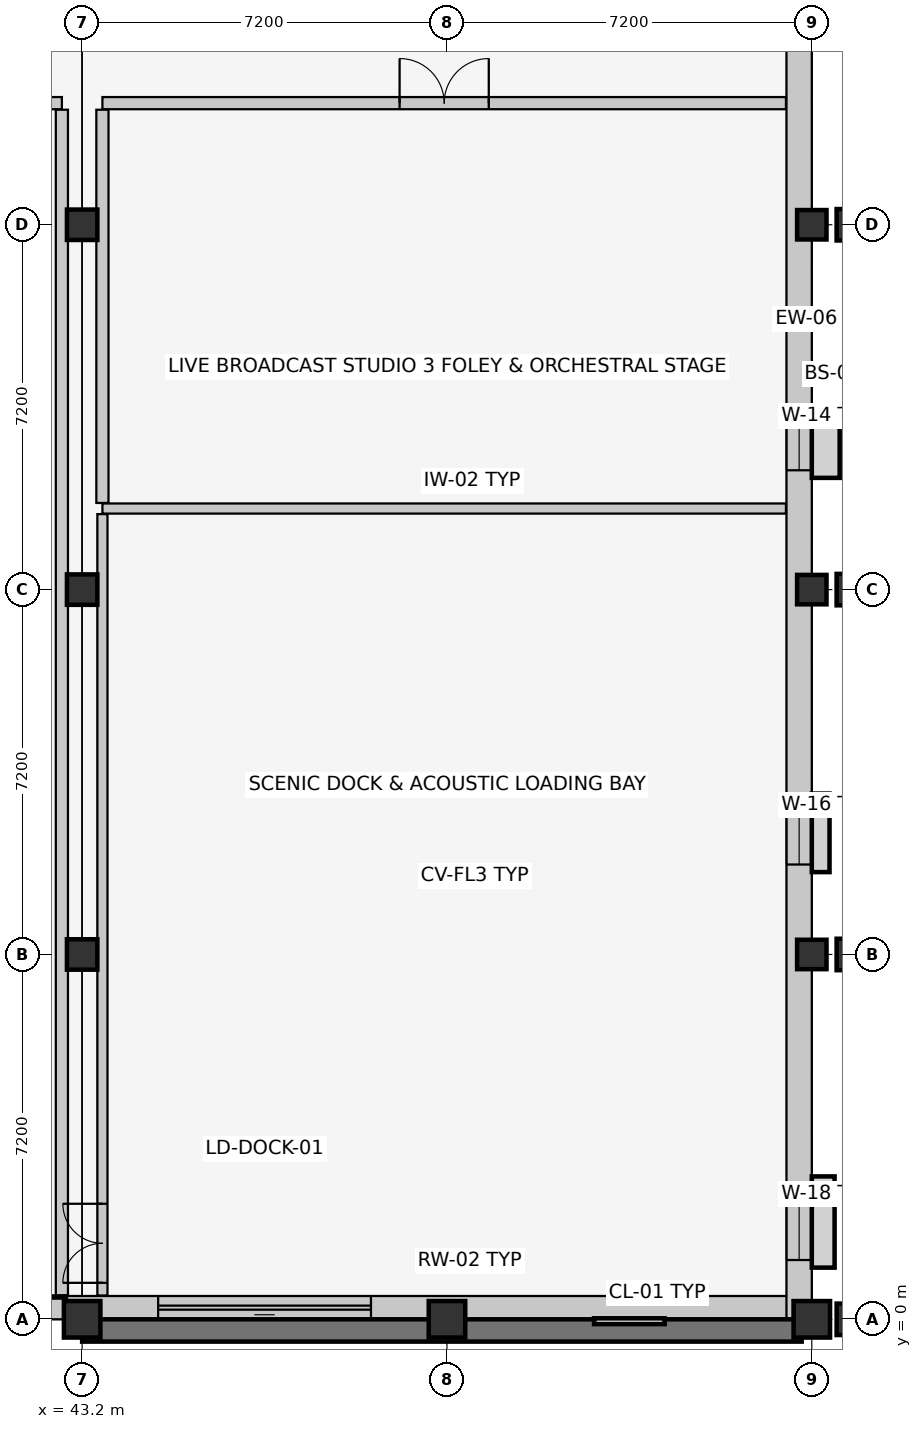
"""IFC4 building model, lengths in metres.
Left out: names, types, materials, properties, quantities, classifications, styles, units other than length and angle.
Written with IfcOpenShell. Run it as: python <this file> out.ifc"""

import sys

from ifc_helpers import new_model, si_unit, direction, frame, frame_2d, origin, origin_2d, place, context, subcontext, project, spatial, rectangle, extrude, element, fill, save


model = new_model("IFC4")
c1 = context("Model", 3, precision=1e-05, world=origin(), true_north=direction((0.0, 1.0)))
c2 = subcontext(c1, "Body", "Model", "MODEL_VIEW")
j1 = project(units=[si_unit("LENGTHUNIT", "METRE"), si_unit("PLANEANGLEUNIT", "RADIAN")], contexts=[c1])
p1 = place(None, origin())
s1 = spatial("IfcSite", under=j1, at=p1, CompositionType="ELEMENT")
p2 = place(p1, origin())
s2 = spatial("IfcBuilding", under=s1, at=p2, CompositionType="ELEMENT")
p3 = place(p2, origin())
s3 = spatial("IfcBuildingStorey", under=s2, at=p3, CompositionType="ELEMENT", Elevation=0.0)
p4 = place(p3, frame((43.2, 0.0, 0.0), z_axis=(0.0, 0.0, 1.0), x_axis=(1.0, 0.0, 0.0)))
e1 = element("IfcColumn", 1, at=p4, inside=s3, PredefinedType="COLUMN", context=c2, shape_type="SweptSolid", body=[
    extrude(rectangle(XDim=0.72, YDim=0.72, at=origin_2d()), origin(), (0.0, 0.0, 1.0), 5.4),
])
for number, where, z_axis, x_axis in (
    (2, (43.2, 7.2, 0.0), (0.0, 0.0, 1.0), (1.0, 0.0, 0.0)),
    (3, (43.2, 14.4, 0.0), (0.0, 0.0, 1.0), (1.0, 0.0, 0.0)),
    (4, (43.2, 21.6, 0.0), (0.0, 0.0, 1.0), (1.0, 0.0, 0.0)),
):
    element("IfcColumn", number, at=place(p3, frame(where, z_axis=z_axis, x_axis=x_axis)), inside=s3, PredefinedType="COLUMN", context=c2, shape_type="SweptSolid", body=[
        extrude(rectangle(XDim=0.6, YDim=0.6, at=origin_2d()), origin(), (0.0, 0.0, 1.0), 5.4),
    ])
for number, where, z_axis, x_axis in (
    (5, (50.4, 0.0, 0.0), (0.0, 0.0, 1.0), (1.0, 0.0, 0.0)),
    (6, (57.6, 0.0, 0.0), (0.0, 0.0, 1.0), (1.0, 0.0, 0.0)),
):
    element("IfcColumn", number, at=place(p3, frame(where, z_axis=z_axis, x_axis=x_axis)), inside=s3, PredefinedType="COLUMN", context=c2, shape_type="SweptSolid", body=[
        extrude(rectangle(XDim=0.72, YDim=0.72, at=origin_2d()), origin(), (0.0, 0.0, 1.0), 5.4),
    ])
for number, where, z_axis, x_axis in (
    (7, (57.6, 7.2, 0.0), (0.0, 0.0, 1.0), (1.0, 0.0, 0.0)),
    (8, (57.6, 14.4, 0.0), (0.0, 0.0, 1.0), (1.0, 0.0, 0.0)),
    (9, (57.6, 21.6, 0.0), (0.0, 0.0, 1.0), (1.0, 0.0, 0.0)),
):
    element("IfcColumn", number, at=place(p3, frame(where, z_axis=z_axis, x_axis=x_axis)), inside=s3, PredefinedType="COLUMN", context=c2, shape_type="SweptSolid", body=[
        extrude(rectangle(XDim=0.58, YDim=0.58, at=origin_2d()), origin(), (0.0, 0.0, 1.0), 5.4),
    ])
for number, where, z_axis, x_axis in (
    (10, (58.4, 0.0, 0.0), (0.0, 0.0, 1.0), (1.0, 0.0, 0.0)),
    (11, (58.4, 7.2, 0.0), (0.0, 0.0, 1.0), (1.0, 0.0, 0.0)),
    (12, (58.4, 14.4, 0.0), (0.0, 0.0, 1.0), (1.0, 0.0, 0.0)),
    (13, (58.4, 21.6, 0.0), (0.0, 0.0, 1.0), (1.0, 0.0, 0.0)),
):
    element("IfcColumn", number, at=place(p3, frame(where, z_axis=z_axis, x_axis=x_axis)), inside=s3, PredefinedType="COLUMN", context=c2, shape_type="SweptSolid", body=[
        extrude(rectangle(XDim=0.62, YDim=0.62, at=origin_2d()), origin(), (0.0, 0.0, 1.0), 5.4),
    ])
p5 = place(p3, frame((57.6, 0.23, 0.0), z_axis=(0.0, 0.0, 1.0), x_axis=(-1.0, 0.0, 0.0)))
e14 = element("IfcWall", 14, at=p5, inside=s3, PredefinedType="SOLIDWALL", context=c2, shape_type="SweptSolid", body=[
    extrude(rectangle(XDim=57.6, YDim=0.46, at=frame_2d((28.8, 0.0))), origin(), (0.0, 0.0, 1.0), 5.4),
])
p6 = place(p5, frame((8.7, 0.0, 0.0)))
e15 = element("IfcOpeningElement", 15, at=p6, cuts=e14, PredefinedType="OPENING", context=c2, shape_type="SweptSolid", body=[
    extrude(rectangle(XDim=4.2, YDim=4.8, at=frame_2d((2.1, 2.4))), frame((0.0, 0.242, 0.0), z_axis=(0.0, -1.0, 0.0), x_axis=(1.0, 0.0, 0.0)), (0.0, 0.0, 1.0), 0.484),
])
p7 = place(p3, frame((57.35, 38.4, 0.0), z_axis=(0.0, 0.0, 1.0), x_axis=(0.0, -1.0, 0.0)))
e16 = element("IfcWall", 16, at=p7, inside=s3, PredefinedType="SOLIDWALL", context=c2, shape_type="SweptSolid", body=[
    extrude(rectangle(XDim=38.4, YDim=0.5, at=frame_2d((19.2, 0.0))), origin(), (0.0, 0.0, 1.0), 4.255),
])
p8 = place(p7, frame((10.9, 0.0, 0.0)))
e17 = element("IfcOpeningElement", 17, at=p8, cuts=e16, PredefinedType="OPENING", context=c2, shape_type="SweptSolid", body=[
    extrude(rectangle(XDim=2.2, YDim=2.4, at=frame_2d((1.1, 1.2))), frame((0.0, 0.262, 0.0), z_axis=(0.0, -1.0, 0.0), x_axis=(1.0, 0.0, 0.0)), (0.0, 0.0, 1.0), 0.524),
])
p9 = place(p7, frame((1.345, 0.0, 0.9)))
e18 = element("IfcOpeningElement", 18, at=p9, cuts=e16, PredefinedType="OPENING", context=c2, shape_type="SweptSolid", body=[
    extrude(rectangle(XDim=1.15, YDim=1.45, at=frame_2d((0.575, 0.725))), frame((0.0, 0.262, 0.0), z_axis=(0.0, -1.0, 0.0), x_axis=(1.0, 0.0, 0.0)), (0.0, 0.0, 1.0), 0.524),
])
p10 = place(p7, frame((5.135, 0.0, 0.9)))
e19 = element("IfcOpeningElement", 19, at=p10, cuts=e16, PredefinedType="OPENING", context=c2, shape_type="SweptSolid", body=[
    extrude(rectangle(XDim=1.25, YDim=1.45, at=frame_2d((0.625, 0.725))), frame((0.0, 0.262, 0.0), z_axis=(0.0, -1.0, 0.0), x_axis=(1.0, 0.0, 0.0)), (0.0, 0.0, 1.0), 0.524),
])
p11 = place(p7, frame((20.595, 0.0, 0.9)))
e20 = element("IfcOpeningElement", 20, at=p11, cuts=e16, PredefinedType="OPENING", context=c2, shape_type="SweptSolid", body=[
    extrude(rectangle(XDim=1.05, YDim=1.6, at=frame_2d((0.525, 0.8))), frame((0.0, 0.262, 0.0), z_axis=(0.0, -1.0, 0.0), x_axis=(1.0, 0.0, 0.0)), (0.0, 0.0, 1.0), 0.524),
])
p12 = place(p7, frame((28.175, 0.0, 0.9)))
e21 = element("IfcOpeningElement", 21, at=p12, cuts=e16, PredefinedType="OPENING", context=c2, shape_type="SweptSolid", body=[
    extrude(rectangle(XDim=1.25, YDim=1.6, at=frame_2d((0.625, 0.8))), frame((0.0, 0.262, 0.0), z_axis=(0.0, -1.0, 0.0), x_axis=(1.0, 0.0, 0.0)), (0.0, 0.0, 1.0), 0.524),
])
p13 = place(p7, frame((35.73, 0.0, 0.9)))
e22 = element("IfcOpeningElement", 22, at=p13, cuts=e16, PredefinedType="OPENING", context=c2, shape_type="SweptSolid", body=[
    extrude(rectangle(XDim=1.5, YDim=1.6, at=frame_2d((0.75, 0.8))), frame((0.0, 0.262, 0.0), z_axis=(0.0, -1.0, 0.0), x_axis=(1.0, 0.0, 0.0)), (0.0, 0.0, 1.0), 0.524),
])
p14 = place(p3, frame((43.2, -0.22, -0.8), z_axis=(0.0, 0.0, 1.0), x_axis=(1.0, 0.0, 0.0)))
e23 = element("IfcWall", 23, at=p14, inside=s3, PredefinedType="USERDEFINED", context=c2, shape_type="SweptSolid", body=[
    extrude(rectangle(XDim=14.2, YDim=0.44, at=frame_2d((7.1, 0.0))), origin(), (0.0, 0.0, 1.0), 1.3),
])
p15 = place(p3, frame((29.2, 24.0, 0.0), z_axis=(0.0, 0.0, 1.0), x_axis=(1.0, 0.0, 0.0)))
e24 = element("IfcWall", 24, at=p15, inside=s3, PredefinedType="PARTITIONING", context=c2, shape_type="SweptSolid", body=[
    extrude(rectangle(XDim=13.6, YDim=0.24, at=frame_2d((6.8, 0.0))), origin(), (0.0, 0.0, 1.0), 5.15),
])
p16 = place(p15, frame((5.96, 0.0, 0.0)))
e25 = element("IfcOpeningElement", 25, at=p16, cuts=e24, PredefinedType="OPENING", context=c2, shape_type="SweptSolid", body=[
    extrude(rectangle(XDim=1.68, YDim=2.3, at=frame_2d((0.84, 1.15))), frame((0.0, 0.132, 0.0), z_axis=(0.0, -1.0, 0.0), x_axis=(1.0, 0.0, 0.0)), (0.0, 0.0, 1.0), 0.264),
])
p17 = place(p3, frame((42.8, 0.47, 0.0), z_axis=(0.0, 0.0, 1.0), x_axis=(0.0, 1.0, 0.0)))
e26 = element("IfcWall", 26, at=p17, inside=s3, PredefinedType="PARTITIONING", context=c2, shape_type="SweptSolid", body=[
    extrude(rectangle(XDim=23.4, YDim=0.24, at=frame_2d((11.7, 0.0))), origin(), (0.0, 0.0, 1.0), 5.15),
])
p18 = place(p3, frame((43.6, 16.0, 0.0), z_axis=(0.0, 0.0, 1.0), x_axis=(1.0, 0.0, 0.0)))
e27 = element("IfcWall", 27, at=p18, inside=s3, PredefinedType="PARTITIONING", context=c2, shape_type="SweptSolid", body=[
    extrude(rectangle(XDim=13.49, YDim=0.2, at=frame_2d((6.745, 0.0))), origin(), (0.0, 0.0, 1.0), 5.15),
])
p19 = place(p3, frame((43.6, 0.47, 0.0), z_axis=(0.0, 0.0, 1.0), x_axis=(0.0, 1.0, 0.0)))
e28 = element("IfcWall", 28, at=p19, inside=s3, PredefinedType="PARTITIONING", context=c2, shape_type="SweptSolid", body=[
    extrude(rectangle(XDim=15.42, YDim=0.2, at=frame_2d((7.71, 0.0))), origin(), (0.0, 0.0, 1.0), 5.15),
])
p20 = place(p19, frame((0.25, 0.0, 0.0)))
e29 = element("IfcOpeningElement", 29, at=p20, cuts=e28, PredefinedType="OPENING", context=c2, shape_type="SweptSolid", body=[
    extrude(rectangle(XDim=1.56, YDim=2.25, at=frame_2d((0.78, 1.125))), frame((0.0, 0.112, 0.0), z_axis=(0.0, -1.0, 0.0), x_axis=(1.0, 0.0, 0.0)), (0.0, 0.0, 1.0), 0.224),
])
p21 = place(p3, frame((43.6, 24.0, 0.0), z_axis=(0.0, 0.0, 1.0), x_axis=(1.0, 0.0, 0.0)))
e30 = element("IfcWall", 30, at=p21, inside=s3, PredefinedType="PARTITIONING", context=c2, shape_type="SweptSolid", body=[
    extrude(rectangle(XDim=13.49, YDim=0.24, at=frame_2d((6.745, 0.0))), origin(), (0.0, 0.0, 1.0), 5.15),
])
p22 = place(p21, frame((5.865, 0.0, 0.0)))
e31 = element("IfcOpeningElement", 31, at=p22, cuts=e30, PredefinedType="OPENING", context=c2, shape_type="SweptSolid", body=[
    extrude(rectangle(XDim=1.76, YDim=2.3, at=frame_2d((0.88, 1.15))), frame((0.0, 0.132, 0.0), z_axis=(0.0, -1.0, 0.0), x_axis=(1.0, 0.0, 0.0)), (0.0, 0.0, 1.0), 0.264),
])
p23 = place(p3, frame((43.6, 16.11, 0.0), z_axis=(0.0, 0.0, 1.0), x_axis=(0.0, 1.0, 0.0)))
e32 = element("IfcWall", 32, at=p23, inside=s3, PredefinedType="PARTITIONING", context=c2, shape_type="SweptSolid", body=[
    extrude(rectangle(XDim=7.76, YDim=0.24, at=frame_2d((3.88, 0.0))), origin(), (0.0, 0.0, 1.0), 5.15),
])
p24 = place(p6, origin())
e33 = element("IfcDoor", 33, at=p24, inside=s3, OperationType="ROLLINGUP", PredefinedType="GATE", context=c2, shape_type="SweptSolid", body=[
    extrude(rectangle(XDim=4.2, YDim=4.8, at=frame_2d((2.1, 2.4))), frame((0.0, 0.025, 0.0), z_axis=(0.0, -1.0, 0.0), x_axis=(1.0, 0.0, 0.0)), (0.0, 0.0, 1.0), 0.05),
])
fill(e15, e33)
p25 = place(p11, origin())
e34 = element("IfcWindow", 34, at=p25, inside=s3, PartitioningType="SINGLE_PANEL", PredefinedType="WINDOW", context=c2, shape_type="SweptSolid", body=[
    extrude(rectangle(XDim=1.05, YDim=1.6, at=frame_2d((0.525, 0.8))), frame((0.0, 0.03, 0.0), z_axis=(0.0, -1.0, 0.0), x_axis=(1.0, 0.0, 0.0)), (0.0, 0.0, 1.0), 0.06),
])
fill(e20, e34)
p26 = place(p12, origin())
e35 = element("IfcWindow", 35, at=p26, inside=s3, PartitioningType="SINGLE_PANEL", PredefinedType="WINDOW", context=c2, shape_type="SweptSolid", body=[
    extrude(rectangle(XDim=1.25, YDim=1.6, at=frame_2d((0.625, 0.8))), frame((0.0, 0.03, 0.0), z_axis=(0.0, -1.0, 0.0), x_axis=(1.0, 0.0, 0.0)), (0.0, 0.0, 1.0), 0.06),
])
fill(e21, e35)
p27 = place(p13, origin())
e36 = element("IfcWindow", 36, at=p27, inside=s3, PartitioningType="SINGLE_PANEL", PredefinedType="WINDOW", context=c2, shape_type="SweptSolid", body=[
    extrude(rectangle(XDim=1.5, YDim=1.6, at=frame_2d((0.75, 0.8))), frame((0.0, 0.03, 0.0), z_axis=(0.0, -1.0, 0.0), x_axis=(1.0, 0.0, 0.0)), (0.0, 0.0, 1.0), 0.06),
])
fill(e22, e36)
p28 = place(p20, origin())
e37 = element("IfcDoor", 37, at=p28, inside=s3, OperationType="DOUBLE_DOOR_SINGLE_SWING", PredefinedType="DOOR", context=c2, shape_type="SweptSolid", body=[
    extrude(rectangle(XDim=1.56, YDim=2.25, at=frame_2d((0.78, 1.125))), frame((0.0, 0.025, 0.0), z_axis=(0.0, -1.0, 0.0), x_axis=(1.0, 0.0, 0.0)), (0.0, 0.0, 1.0), 0.05),
])
fill(e29, e37)
p29 = place(p22, origin())
e38 = element("IfcDoor", 38, at=p29, inside=s3, OperationType="DOUBLE_DOOR_SINGLE_SWING", PredefinedType="DOOR", context=c2, shape_type="SweptSolid", body=[
    extrude(rectangle(XDim=1.76, YDim=2.3, at=frame_2d((0.88, 1.15))), frame((0.0, 0.025, 0.0), z_axis=(0.0, -1.0, 0.0), x_axis=(1.0, 0.0, 0.0)), (0.0, 0.0, 1.0), 0.05),
])
fill(e31, e38)
save(model, sys.argv[1])
